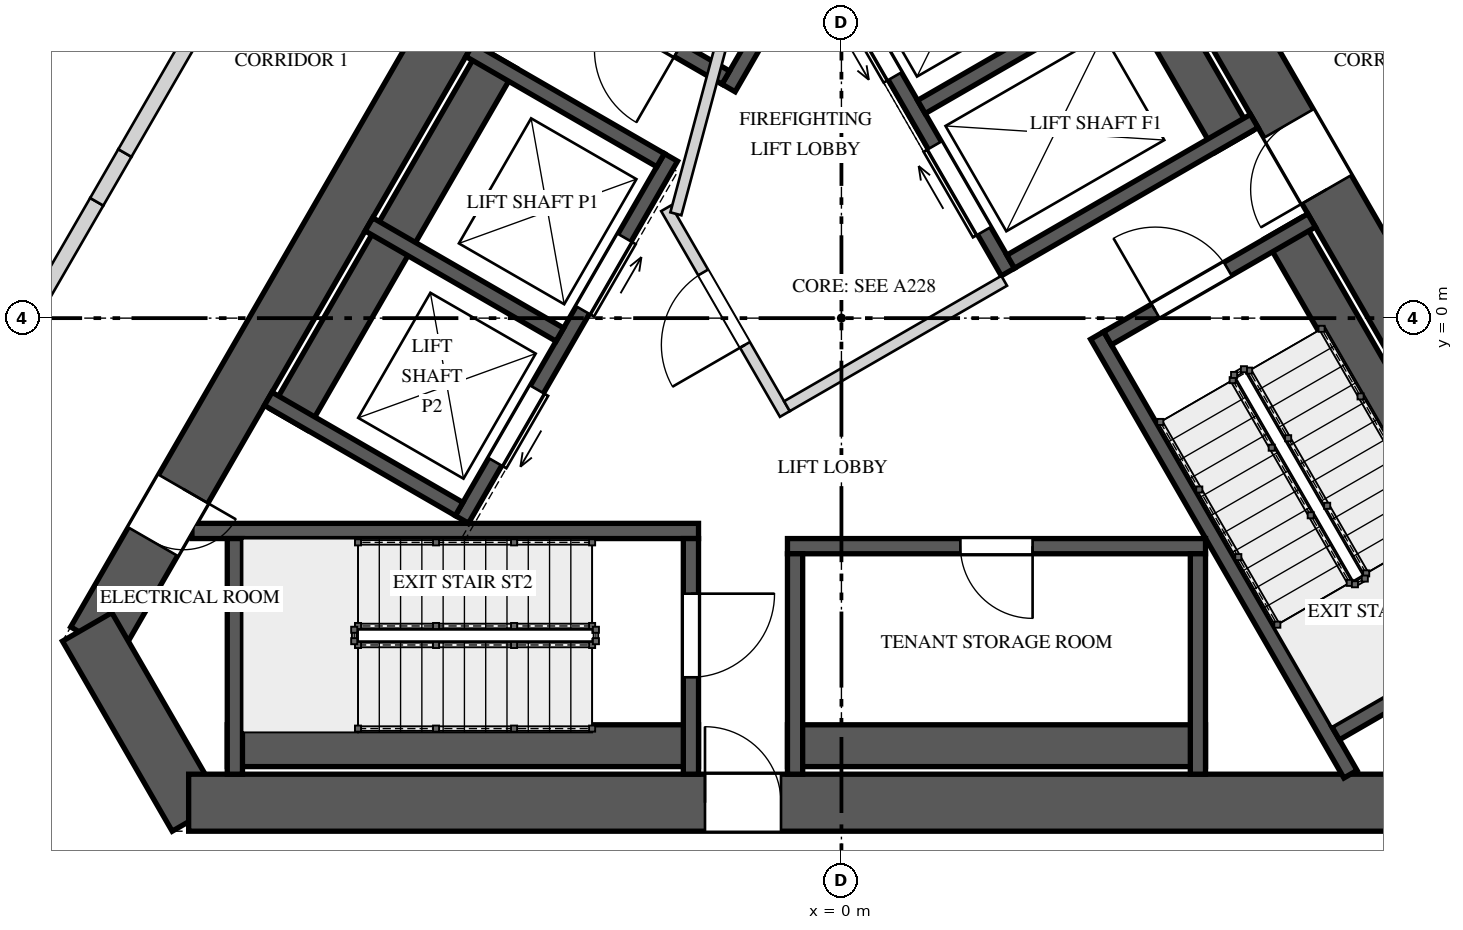
"""IFC4 building model, lengths in metres.
Left out: names, types, materials, properties, quantities, classifications, styles, units other than length and angle.
Written with IfcOpenShell. Run it as: python <this file> out.ifc"""

import sys

from ifc_helpers import new_model, si_unit, direction, frame, frame_2d, origin, place, context, subcontext, project, spatial, rectangle, extrude, element, fill, save


model = new_model("IFC4")
c1 = context("Model", 3, precision=1e-05, world=origin(), true_north=direction((0.0, 1.0)))
c2 = subcontext(c1, "Body", "Model", "MODEL_VIEW")
j1 = project(units=[si_unit("LENGTHUNIT", "METRE"), si_unit("PLANEANGLEUNIT", "RADIAN")], contexts=[c1])
p1 = place(None, origin())
s1 = spatial("IfcSite", under=j1, at=p1, CompositionType="ELEMENT")
p2 = place(p1, origin())
s2 = spatial("IfcBuilding", under=s1, at=p2, CompositionType="ELEMENT")
p3 = place(p2, frame((0.0, 0.0, 200.0)))
s3 = spatial("IfcBuildingStorey", under=s2, at=p3, CompositionType="ELEMENT", Elevation=200.0)
p4 = place(p3, frame((-1.227, 10.625, 0.0), z_axis=(0.0, 0.0, 1.0), x_axis=(-0.500002161919, -0.866024155596, 0.0)))
e1 = element("IfcWall", 1, at=p4, inside=s3, PredefinedType="SHEAR", context=c2, shape_type="SweptSolid", body=[
    extrude(rectangle(XDim=17.176, YDim=0.75, at=frame_2d((8.588, 0.0))), origin(), (0.0, 0.0, 1.0), 4.0),
])
p5 = place(p4, frame((6.793, 0.0, 0.0)))
e2 = element("IfcOpeningElement", 2, at=p5, cuts=e1, PredefinedType="OPENING", context=c2, shape_type="SweptSolid", body=[
    extrude(rectangle(XDim=1.0, YDim=2.4, at=frame_2d((0.5, 1.2))), frame((0.0, 0.385, 0.0), z_axis=(0.0, -1.0, 0.0), x_axis=(1.0, 0.0, 0.0)), (0.0, 0.0, 1.0), 0.77),
])
p6 = place(p4, frame((14.864, 0.0, 0.0)))
e3 = element("IfcOpeningElement", 3, at=p6, cuts=e1, PredefinedType="OPENING", context=c2, shape_type="SweptSolid", body=[
    extrude(rectangle(XDim=0.8, YDim=2.1, at=frame_2d((0.4, 1.05))), frame((0.0, 0.385, 0.0), z_axis=(0.0, -1.0, 0.0), x_axis=(1.0, 0.0, 0.0)), (0.0, 0.0, 1.0), 0.77),
])
p7 = place(p3, frame((-9.923, -4.062, 0.0), z_axis=(0.0, 0.0, 1.0), x_axis=(0.499995765644, -0.866027848477, 0.0)))
e4 = element("IfcWall", 4, at=p7, inside=s3, PredefinedType="SHEAR", context=c2, shape_type="SweptSolid", body=[
    extrude(rectangle(XDim=2.887, YDim=0.75, at=frame_2d((1.443, 0.0))), origin(), (0.0, 0.0, 1.0), 4.0),
])
p8 = place(p3, frame((-8.588, -6.375, 0.0), z_axis=(0.0, 0.0, 1.0), x_axis=(1.0, 0.0, 0.0)))
e5 = element("IfcWall", 5, at=p8, inside=s3, PredefinedType="SHEAR", context=c2, shape_type="SweptSolid", body=[
    extrude(rectangle(XDim=17.176, YDim=0.75, at=frame_2d((8.588, 0.0))), origin(), (0.0, 0.0, 1.0), 4.0),
])
p9 = place(p8, frame((6.793, 0.0, 0.0)))
e6 = element("IfcOpeningElement", 6, at=p9, cuts=e5, PredefinedType="OPENING", context=c2, shape_type="SweptSolid", body=[
    extrude(rectangle(XDim=1.0, YDim=2.4, at=frame_2d((0.5, 1.2))), frame((0.0, 0.385, 0.0), z_axis=(0.0, -1.0, 0.0), x_axis=(1.0, 0.0, 0.0)), (0.0, 0.0, 1.0), 0.77),
])
p10 = place(p3, frame((9.815, -4.25, 0.0), z_axis=(0.0, 0.0, 1.0), x_axis=(-0.500002161919, 0.866024155596, 0.0)))
e7 = element("IfcWall", 7, at=p10, inside=s3, PredefinedType="SHEAR", context=c2, shape_type="SweptSolid", body=[
    extrude(rectangle(XDim=17.176, YDim=0.75, at=frame_2d((8.588, 0.0))), origin(), (0.0, 0.0, 1.0), 4.0),
])
p11 = place(p10, frame((6.863, 0.0, 0.0)))
e8 = element("IfcOpeningElement", 8, at=p11, cuts=e7, PredefinedType="OPENING", context=c2, shape_type="SweptSolid", body=[
    extrude(rectangle(XDim=1.0, YDim=2.4, at=frame_2d((0.5, 1.2))), frame((0.0, 0.385, 0.0), z_axis=(0.0, -1.0, 0.0), x_axis=(1.0, 0.0, 0.0)), (0.0, 0.0, 1.0), 0.77),
])
p12 = place(p3, frame((1.847, 8.8, 0.0), z_axis=(0.0, 0.0, 1.0), x_axis=(-0.499980354584, -0.866036745774, 0.0)))
e9 = element("IfcWall", 9, at=p12, inside=s3, PredefinedType="SOLIDWALL", context=c2, shape_type="SweptSolid", body=[
    extrude(rectangle(XDim=6.665, YDim=0.2, at=frame_2d((3.333, 0.0))), origin(), (0.0, 0.0, 1.0), 3.65),
])
p13 = place(p3, frame((-1.521, 3.165, 0.0), z_axis=(0.0, 0.0, 1.0), x_axis=(-0.86600983753, 0.500026960575, 0.0)))
e10 = element("IfcWall", 10, at=p13, inside=s3, PredefinedType="SOLIDWALL", context=c2, shape_type="SweptSolid", body=[
    extrude(rectangle(XDim=3.1, YDim=0.2, at=frame_2d((1.55, 0.0))), origin(), (0.0, 0.0, 1.0), 3.65),
])
p14 = place(p13, frame((0.725, 0.0, 0.0)))
e11 = element("IfcOpeningElement", 11, at=p14, cuts=e10, PredefinedType="OPENING", context=c2, shape_type="SweptSolid", body=[
    extrude(rectangle(XDim=1.1, YDim=2.4, at=frame_2d((0.55, 1.2))), frame((0.0, 0.11, 0.0), z_axis=(0.0, -1.0, 0.0), x_axis=(1.0, 0.0, 0.0)), (0.0, 0.0, 1.0), 0.22),
])
p15 = place(p3, frame((-8.08, -5.625, 0.0), z_axis=(0.0, 0.0, 1.0), x_axis=(1.0, 0.0, 0.0)))
e12 = element("IfcWall", 12, at=p15, inside=s3, PredefinedType="SOLIDWALL", context=c2, shape_type="SweptSolid", body=[
    extrude(rectangle(XDim=6.2, YDim=0.55, at=frame_2d((3.1, 0.0))), origin(), (0.0, 0.0, 1.0), 3.65),
])
p16 = place(p3, frame((-8.545, -2.8, 0.0), z_axis=(0.0, 0.0, 1.0), x_axis=(1.0, 0.0, 0.0)))
e13 = element("IfcWall", 13, at=p16, inside=s3, PredefinedType="SOLIDWALL", context=c2, shape_type="SweptSolid", body=[
    extrude(rectangle(XDim=6.665, YDim=0.2, at=frame_2d((3.333, 0.0))), origin(), (0.0, 0.0, 1.0), 3.65),
])
p17 = place(p3, frame((-7.98, -2.9, 0.0), z_axis=(0.0, 0.0, 1.0), x_axis=(0.0, -1.0, 0.0)))
e14 = element("IfcWall", 14, at=p17, inside=s3, PredefinedType="SOLIDWALL", context=c2, shape_type="SweptSolid", body=[
    extrude(rectangle(XDim=3.1, YDim=0.2, at=frame_2d((1.55, 0.0))), origin(), (0.0, 0.0, 1.0), 3.65),
])
p18 = place(p3, frame((-1.98, -2.9, 0.0), z_axis=(0.0, 0.0, 1.0), x_axis=(0.0, -1.0, 0.0)))
e15 = element("IfcWall", 15, at=p18, inside=s3, PredefinedType="SOLIDWALL", context=c2, shape_type="SweptSolid", body=[
    extrude(rectangle(XDim=3.1, YDim=0.2, at=frame_2d((1.55, 0.0))), origin(), (0.0, 0.0, 1.0), 3.65),
])
p19 = place(p18, frame((0.725, 0.0, 0.0)))
e16 = element("IfcOpeningElement", 16, at=p19, cuts=e15, PredefinedType="OPENING", context=c2, shape_type="SweptSolid", body=[
    extrude(rectangle(XDim=1.1, YDim=2.4, at=frame_2d((0.55, 1.2))), frame((0.0, 0.11, 0.0), z_axis=(0.0, -1.0, 0.0), x_axis=(1.0, 0.0, 0.0)), (0.0, 0.0, 1.0), 0.22),
])
p20 = place(p3, frame((8.911, -4.185, 0.0), z_axis=(0.0, 0.0, 1.0), x_axis=(-0.500009909098, 0.866019682689, 0.0)))
e17 = element("IfcWall", 17, at=p20, inside=s3, PredefinedType="SOLIDWALL", context=c2, shape_type="SweptSolid", body=[
    extrude(rectangle(XDim=6.2, YDim=0.55, at=frame_2d((3.1, 0.0))), origin(), (0.0, 0.0, 1.0), 3.65),
])
p21 = place(p3, frame((6.697, -6.0, 0.0), z_axis=(0.0, 0.0, 1.0), x_axis=(-0.499980354584, 0.866036745774, 0.0)))
e18 = element("IfcWall", 18, at=p21, inside=s3, PredefinedType="SOLIDWALL", context=c2, shape_type="SweptSolid", body=[
    extrude(rectangle(XDim=6.665, YDim=0.2, at=frame_2d((3.333, 0.0))), origin(), (0.0, 0.0, 1.0), 3.65),
])
p22 = place(p3, frame((6.501, -5.461, 0.0), z_axis=(0.0, 0.0, 1.0), x_axis=(0.86600983753, 0.500026960575, 0.0)))
e19 = element("IfcWall", 19, at=p22, inside=s3, PredefinedType="SOLIDWALL", context=c2, shape_type="SweptSolid", body=[
    extrude(rectangle(XDim=3.1, YDim=0.2, at=frame_2d((1.55, 0.0))), origin(), (0.0, 0.0, 1.0), 3.65),
])
p23 = place(p3, frame((3.501, -0.265, 0.0), z_axis=(0.0, 0.0, 1.0), x_axis=(0.866043940782, 0.499967891604, 0.0)))
e20 = element("IfcWall", 20, at=p23, inside=s3, PredefinedType="SOLIDWALL", context=c2, shape_type="SweptSolid", body=[
    extrude(rectangle(XDim=3.1, YDim=0.2, at=frame_2d((1.55, 0.0))), origin(), (0.0, 0.0, 1.0), 3.65),
])
p24 = place(p23, frame((0.725, 0.0, 0.0)))
e21 = element("IfcOpeningElement", 21, at=p24, cuts=e20, PredefinedType="OPENING", context=c2, shape_type="SweptSolid", body=[
    extrude(rectangle(XDim=1.1, YDim=2.4, at=frame_2d((0.55, 1.2))), frame((0.0, 0.11, 0.0), z_axis=(0.0, -1.0, 0.0), x_axis=(1.0, 0.0, 0.0)), (0.0, 0.0, 1.0), 0.22),
])
p25 = place(p3, frame((-2.243, 2.115, 0.0), z_axis=(0.0, 0.0, 1.0), x_axis=(-0.499996545922, -0.866027397988, 0.0)))
e22 = element("IfcWall", 22, at=p25, inside=s3, PredefinedType="SOLIDWALL", context=c2, shape_type="SweptSolid", body=[
    extrude(rectangle(XDim=5.5, YDim=0.2, at=frame_2d((2.75, 0.0))), origin(), (0.0, 0.0, 1.0), 3.65),
])
p26 = place(p25, frame((1.22, 0.0, 0.0)))
e23 = element("IfcOpeningElement", 23, at=p26, cuts=e22, PredefinedType="OPENING", context=c2, shape_type="SweptSolid", body=[
    extrude(rectangle(XDim=1.1, YDim=2.1, at=frame_2d((0.55, 1.05))), frame((0.0, 0.11, 0.0), z_axis=(0.0, -1.0, 0.0), x_axis=(1.0, 0.0, 0.0)), (0.0, 0.0, 1.0), 0.22),
])
p27 = place(p25, frame((3.525, 0.0, 0.0)))
e24 = element("IfcOpeningElement", 24, at=p27, cuts=e22, PredefinedType="OPENING", context=c2, shape_type="SweptSolid", body=[
    extrude(rectangle(XDim=1.1, YDim=2.1, at=frame_2d((0.55, 1.05))), frame((0.0, 0.11, 0.0), z_axis=(0.0, -1.0, 0.0), x_axis=(1.0, 0.0, 0.0)), (0.0, 0.0, 1.0), 0.22),
])
p28 = place(p3, frame((-4.516, 3.427, 0.0), z_axis=(0.0, 0.0, 1.0), x_axis=(-0.499996545922, -0.866027397988, 0.0)))
e25 = element("IfcWall", 25, at=p28, inside=s3, PredefinedType="SOLIDWALL", context=c2, shape_type="SweptSolid", body=[
    extrude(rectangle(XDim=5.5, YDim=0.55, at=frame_2d((2.75, 0.0))), origin(), (0.0, 0.0, 1.0), 3.65),
])
p29 = place(p3, frame((-2.38, 2.078, 0.0), z_axis=(0.0, 0.0, 1.0), x_axis=(-0.866032775405, 0.499987231761, 0.0)))
e26 = element("IfcWall", 26, at=p29, inside=s3, PredefinedType="SOLIDWALL", context=c2, shape_type="SweptSolid", body=[
    extrude(rectangle(XDim=2.9, YDim=0.2, at=frame_2d((1.45, 0.0))), origin(), (0.0, 0.0, 1.0), 3.65),
])
p30 = place(p3, frame((-3.705, -0.217, 0.0), z_axis=(0.0, 0.0, 1.0), x_axis=(-0.865996321171, 0.50005036918, 0.0)))
e27 = element("IfcWall", 27, at=p30, inside=s3, PredefinedType="SOLIDWALL", context=c2, shape_type="SweptSolid", body=[
    extrude(rectangle(XDim=2.9, YDim=0.2, at=frame_2d((1.45, 0.0))), origin(), (0.0, 0.0, 1.0), 3.65),
])
p31 = place(p3, frame((-5.03, -2.512, 0.0), z_axis=(0.0, 0.0, 1.0), x_axis=(-0.866032775405, 0.499987231761, 0.0)))
e28 = element("IfcWall", 28, at=p31, inside=s3, PredefinedType="SOLIDWALL", context=c2, shape_type="SweptSolid", body=[
    extrude(rectangle(XDim=2.9, YDim=0.2, at=frame_2d((1.45, 0.0))), origin(), (0.0, 0.0, 1.0), 3.65),
])
p32 = place(p3, frame((4.79, -3.0, 0.0), z_axis=(0.0, 0.0, 1.0), x_axis=(-1.0, 0.0, 0.0)))
e29 = element("IfcWall", 29, at=p32, inside=s3, PredefinedType="SOLIDWALL", context=c2, shape_type="SweptSolid", body=[
    extrude(rectangle(XDim=5.5, YDim=0.2, at=frame_2d((2.75, 0.0))), origin(), (0.0, 0.0, 1.0), 3.65),
])
p33 = place(p32, frame((2.275, 0.0, 0.0)))
e30 = element("IfcOpeningElement", 30, at=p33, cuts=e29, PredefinedType="OPENING", context=c2, shape_type="SweptSolid", body=[
    extrude(rectangle(XDim=0.95, YDim=2.4, at=frame_2d((0.475, 1.2))), frame((0.0, 0.11, 0.0), z_axis=(0.0, -1.0, 0.0), x_axis=(1.0, 0.0, 0.0)), (0.0, 0.0, 1.0), 0.22),
])
p34 = place(p3, frame((-0.71, -5.625, 0.0), z_axis=(0.0, 0.0, 1.0), x_axis=(1.0, 0.0, 0.0)))
e31 = element("IfcWall", 31, at=p34, inside=s3, PredefinedType="SOLIDWALL", context=c2, shape_type="SweptSolid", body=[
    extrude(rectangle(XDim=5.5, YDim=0.55, at=frame_2d((2.75, 0.0))), origin(), (0.0, 0.0, 1.0), 3.65),
])
for number, where, z_axis, x_axis in (
    (32, (-0.61, -3.1, 0.0), (0.0, 0.0, 1.0), (0.0, -1.0, 0.0)),
    (33, (4.69, -3.1, 0.0), (0.0, 0.0, 1.0), (0.0, -1.0, 0.0)),
):
    element("IfcWall", number, at=place(p3, frame(where, z_axis=z_axis, x_axis=x_axis)), inside=s3, PredefinedType="SOLIDWALL", context=c2, shape_type="SweptSolid", body=[
        extrude(rectangle(XDim=2.9, YDim=0.2, at=frame_2d((1.45, 0.0))), origin(), (0.0, 0.0, 1.0), 3.65),
    ])
p35 = place(p3, frame((2.19, 0.606, 0.0), z_axis=(0.0, 0.0, 1.0), x_axis=(-0.500002801628, 0.866023786258, 0.0)))
e34 = element("IfcWall", 34, at=p35, inside=s3, PredefinedType="SOLIDWALL", context=c2, shape_type="SweptSolid", body=[
    extrude(rectangle(XDim=4.9, YDim=0.2, at=frame_2d((2.45, 0.0))), origin(), (0.0, 0.0, 1.0), 3.65),
])
p36 = place(p35, frame((0.625, 0.0, 0.0)))
e35 = element("IfcOpeningElement", 35, at=p36, cuts=e34, PredefinedType="OPENING", context=c2, shape_type="SweptSolid", body=[
    extrude(rectangle(XDim=1.3, YDim=2.1, at=frame_2d((0.65, 1.05))), frame((0.0, 0.11, 0.0), z_axis=(0.0, -1.0, 0.0), x_axis=(1.0, 0.0, 0.0)), (0.0, 0.0, 1.0), 0.22),
])
p37 = place(p35, frame((2.975, 0.0, 0.0)))
e36 = element("IfcOpeningElement", 36, at=p37, cuts=e34, PredefinedType="OPENING", context=c2, shape_type="SweptSolid", body=[
    extrude(rectangle(XDim=1.3, YDim=2.1, at=frame_2d((0.65, 1.05))), frame((0.0, 0.11, 0.0), z_axis=(0.0, -1.0, 0.0), x_axis=(1.0, 0.0, 0.0)), (0.0, 0.0, 1.0), 0.22),
])
p38 = place(p3, frame((5.156, 2.319, 0.0), z_axis=(0.0, 0.0, 1.0), x_axis=(-0.500018594424, 0.866014668023, 0.0)))
e37 = element("IfcWall", 37, at=p38, inside=s3, PredefinedType="SOLIDWALL", context=c2, shape_type="SweptSolid", body=[
    extrude(rectangle(XDim=4.9, YDim=0.55, at=frame_2d((2.45, 0.0))), origin(), (0.0, 0.0, 1.0), 3.65),
])
for number, where, z_axis, x_axis in (
    (38, (2.227, 0.743, 0.0), (0.0, 0.0, 1.0), (0.866, 0.5, 0.0)),
    (39, (1.052, 2.778, 0.0), (0.0, 0.0, 1.0), (0.866, 0.5, 0.0)),
):
    element("IfcWall", number, at=place(p3, frame(where, z_axis=z_axis, x_axis=x_axis)), inside=s3, PredefinedType="SOLIDWALL", context=c2, shape_type="SweptSolid", body=[
        extrude(rectangle(XDim=3.7, YDim=0.2, at=frame_2d((1.85, 0.0))), origin(), (0.0, 0.0, 1.0), 3.65),
    ])
p39 = place(p3, frame((-0.744, -1.261, 0.0), z_axis=(0.0, 0.0, 1.0), x_axis=(-0.500004234368, 0.866022959057, 0.0)))
e40 = element("IfcWall", 40, at=p39, inside=s3, PredefinedType="PARTITIONING", context=c2, shape_type="SweptSolid", body=[
    extrude(rectangle(XDim=3.125, YDim=0.15, at=frame_2d((1.562, 0.0))), origin(), (0.0, 0.0, 1.0), 3.65),
])
p40 = place(p39, frame((1.05, 0.0, 0.0)))
e41 = element("IfcOpeningElement", 41, at=p40, cuts=e40, PredefinedType="OPENING", context=c2, shape_type="SweptSolid", body=[
    extrude(rectangle(XDim=1.1, YDim=2.4, at=frame_2d((0.55, 1.2))), frame((0.0, 0.085, 0.0), z_axis=(0.0, -1.0, 0.0), x_axis=(1.0, 0.0, 0.0)), (0.0, 0.0, 1.0), 0.17),
])
p41 = place(p3, frame((-0.717, -1.159, 0.0), z_axis=(0.0, 0.0, 1.0), x_axis=(0.866008176907, 0.50002983664, 0.0)))
e42 = element("IfcWall", 42, at=p41, inside=s3, PredefinedType="PARTITIONING", context=c2, shape_type="SweptSolid", body=[
    extrude(rectangle(XDim=3.3, YDim=0.15, at=frame_2d((1.65, 0.0))), origin(), (0.0, 0.0, 1.0), 3.65),
])
p42 = place(p3, frame((-2.178, 1.372, 0.0), z_axis=(0.0, 0.0, 1.0), x_axis=(0.258808958833, 0.96592852884, 0.0)))
e43 = element("IfcWall", 43, at=p42, inside=s3, PredefinedType="PARTITIONING", context=c2, shape_type="SweptSolid", body=[
    extrude(rectangle(XDim=2.903, YDim=0.15, at=frame_2d((1.451, 0.0))), origin(), (0.0, 0.0, 1.0), 3.65),
])
p43 = place(p3, frame((-11.304, 2.521, 0.0), z_axis=(0.0, 0.0, 1.0), x_axis=(0.49998782916, 0.866032430508, 0.0)))
e44 = element("IfcWall", 44, at=p43, inside=s3, PredefinedType="PARTITIONING", context=c2, shape_type="SweptSolid", body=[
    extrude(rectangle(XDim=2.92, YDim=0.15, at=frame_2d((1.46, 0.0))), origin(), (0.0, 0.0, 1.0), 3.65),
])
p44 = place(p3, frame((-12.388, -2.957, 0.0), z_axis=(0.0, 0.0, 1.0), x_axis=(0.499990271856, 0.866031020258, 0.0)))
e45 = element("IfcWall", 45, at=p44, inside=s3, PredefinedType="SOLIDWALL", context=c2, shape_type="SweptSolid", body=[
    extrude(rectangle(XDim=5.182, YDim=0.2, at=frame_2d((2.591, 0.0))), origin(), (0.0, 0.0, 1.0), 3.65),
])
p45 = place(p3, frame((-9.797, 1.531, 0.0), z_axis=(0.0, 0.0, 1.0), x_axis=(0.499931655587, 0.866064858854, 0.0)))
e46 = element("IfcWall", 46, at=p45, inside=s3, PredefinedType="SOLIDWALL", context=c2, shape_type="SweptSolid", body=[
    extrude(rectangle(XDim=0.741, YDim=0.2, at=frame_2d((0.37, 0.0))), origin(), (0.0, 0.0, 1.0), 2.95),
])
p46 = place(p3, frame((-9.427, 2.172, 0.0), z_axis=(0.0, 0.0, 1.0), x_axis=(0.500013761451, 0.866017458461, 0.0)))
e47 = element("IfcWall", 47, at=p46, inside=s3, PredefinedType="SOLIDWALL", context=c2, shape_type="SweptSolid", body=[
    extrude(rectangle(XDim=2.297, YDim=0.2, at=frame_2d((1.149, 0.0))), origin(), (0.0, 0.0, 1.0), 3.65),
])
p47 = place(p19, origin())
e48 = element("IfcDoor", 48, at=p47, inside=s3, OperationType="SINGLE_SWING_LEFT", PredefinedType="DOOR", context=c2, shape_type="SweptSolid", body=[
    extrude(rectangle(XDim=1.1, YDim=2.4, at=frame_2d((0.55, 1.2))), frame((0.0, 0.025, 0.0), z_axis=(0.0, -1.0, 0.0), x_axis=(1.0, 0.0, 0.0)), (0.0, 0.0, 1.0), 0.05),
])
fill(e16, e48)
p48 = place(p24, origin())
e49 = element("IfcDoor", 49, at=p48, inside=s3, OperationType="SINGLE_SWING_RIGHT", PredefinedType="DOOR", context=c2, shape_type="SweptSolid", body=[
    extrude(rectangle(XDim=1.1, YDim=2.4, at=frame_2d((0.55, 1.2))), frame((0.0, 0.025, 0.0), z_axis=(0.0, -1.0, 0.0), x_axis=(1.0, 0.0, 0.0)), (0.0, 0.0, 1.0), 0.05),
])
fill(e21, e49)
p49 = place(p26, origin())
e50 = element("IfcDoor", 50, at=p49, inside=s3, OperationType="SLIDING_TO_LEFT", PredefinedType="DOOR", context=c2, shape_type="SweptSolid", body=[
    extrude(rectangle(XDim=1.1, YDim=2.1, at=frame_2d((0.55, 1.05))), frame((0.0, 0.025, 0.0), z_axis=(0.0, -1.0, 0.0), x_axis=(1.0, 0.0, 0.0)), (0.0, 0.0, 1.0), 0.05),
])
fill(e23, e50)
p50 = place(p27, origin())
e51 = element("IfcDoor", 51, at=p50, inside=s3, OperationType="SLIDING_TO_RIGHT", PredefinedType="DOOR", context=c2, shape_type="SweptSolid", body=[
    extrude(rectangle(XDim=1.1, YDim=2.1, at=frame_2d((0.55, 1.05))), frame((0.0, 0.025, 0.0), z_axis=(0.0, -1.0, 0.0), x_axis=(1.0, 0.0, 0.0)), (0.0, 0.0, 1.0), 0.05),
])
fill(e24, e51)
p51 = place(p33, origin())
e52 = element("IfcDoor", 52, at=p51, inside=s3, OperationType="SINGLE_SWING_LEFT", PredefinedType="DOOR", context=c2, shape_type="SweptSolid", body=[
    extrude(rectangle(XDim=0.95, YDim=2.4, at=frame_2d((0.475, 1.2))), frame((0.0, 0.025, 0.0), z_axis=(0.0, -1.0, 0.0), x_axis=(1.0, 0.0, 0.0)), (0.0, 0.0, 1.0), 0.05),
])
fill(e30, e52)
p52 = place(p36, origin())
e53 = element("IfcDoor", 53, at=p52, inside=s3, OperationType="SLIDING_TO_RIGHT", PredefinedType="DOOR", context=c2, shape_type="SweptSolid", body=[
    extrude(rectangle(XDim=1.3, YDim=2.1, at=frame_2d((0.65, 1.05))), frame((0.0, 0.025, 0.0), z_axis=(0.0, -1.0, 0.0), x_axis=(1.0, 0.0, 0.0)), (0.0, 0.0, 1.0), 0.05),
])
fill(e35, e53)
p53 = place(p37, origin())
e54 = element("IfcDoor", 54, at=p53, inside=s3, OperationType="SLIDING_TO_LEFT", PredefinedType="DOOR", context=c2, shape_type="SweptSolid", body=[
    extrude(rectangle(XDim=1.3, YDim=2.1, at=frame_2d((0.65, 1.05))), frame((0.0, 0.025, 0.0), z_axis=(0.0, -1.0, 0.0), x_axis=(1.0, 0.0, 0.0)), (0.0, 0.0, 1.0), 0.05),
])
fill(e36, e54)
p54 = place(p40, origin())
e55 = element("IfcDoor", 55, at=p54, inside=s3, OperationType="SINGLE_SWING_RIGHT", PredefinedType="DOOR", context=c2, shape_type="SweptSolid", body=[
    extrude(rectangle(XDim=1.1, YDim=2.4, at=frame_2d((0.55, 1.2))), frame((0.0, 0.025, 0.0), z_axis=(0.0, -1.0, 0.0), x_axis=(1.0, 0.0, 0.0)), (0.0, 0.0, 1.0), 0.05),
])
fill(e41, e55)
p55 = place(p9, origin())
e56 = element("IfcDoor", 56, at=p55, inside=s3, OperationType="SINGLE_SWING_RIGHT", PredefinedType="DOOR", context=c2, shape_type="SweptSolid", body=[
    extrude(rectangle(XDim=1.0, YDim=2.4, at=frame_2d((0.5, 1.2))), frame((0.0, 0.025, 0.0), z_axis=(0.0, -1.0, 0.0), x_axis=(1.0, 0.0, 0.0)), (0.0, 0.0, 1.0), 0.05),
])
fill(e6, e56)
p56 = place(p11, origin())
e57 = element("IfcDoor", 57, at=p56, inside=s3, OperationType="SINGLE_SWING_LEFT", PredefinedType="DOOR", context=c2, shape_type="SweptSolid", body=[
    extrude(rectangle(XDim=1.0, YDim=2.4, at=frame_2d((0.5, 1.2))), frame((0.0, 0.025, 0.0), z_axis=(0.0, -1.0, 0.0), x_axis=(1.0, 0.0, 0.0)), (0.0, 0.0, 1.0), 0.05),
])
fill(e8, e57)
p57 = place(p6, origin())
e58 = element("IfcDoor", 58, at=p57, inside=s3, OperationType="SINGLE_SWING_RIGHT", PredefinedType="DOOR", context=c2, shape_type="SweptSolid", body=[
    extrude(rectangle(XDim=0.8, YDim=2.1, at=frame_2d((0.4, 1.05))), frame((0.0, 0.025, 0.0), z_axis=(0.0, -1.0, 0.0), x_axis=(1.0, 0.0, 0.0)), (0.0, 0.0, 1.0), 0.05),
])
fill(e3, e58)
save(model, sys.argv[1])
